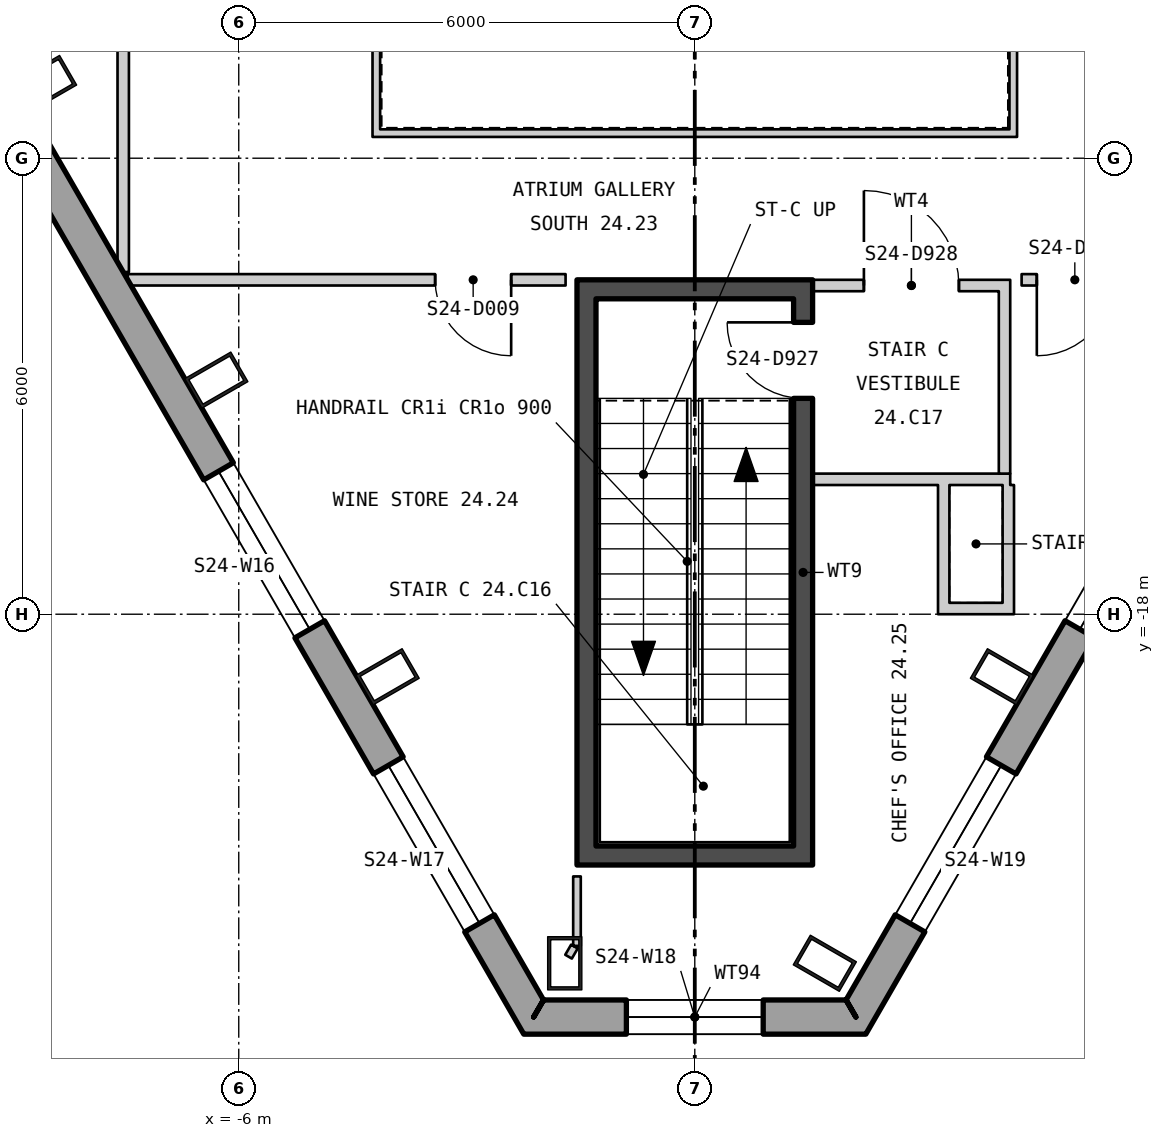
"""IFC4 building model, lengths in metres.
Left out: names, types, materials, properties, quantities, classifications, styles, units other than length and angle.
Written with IfcOpenShell. Run it as: python <this file> out.ifc"""

import sys

from ifc_helpers import new_model, si_unit, direction, frame, frame_2d, origin, origin_2d, place, context, subcontext, project, spatial, polyline, rectangle, hollow_rectangle, outline, extrude, element, fill, save


model = new_model("IFC4")
c1 = context("Model", 3, precision=1e-05, world=origin(), true_north=direction((0.0, 1.0)))
c2 = subcontext(c1, "Body", "Model", "MODEL_VIEW")
j1 = project(units=[si_unit("LENGTHUNIT", "METRE"), si_unit("PLANEANGLEUNIT", "RADIAN")], contexts=[c1])
p1 = place(None, origin())
s1 = spatial("IfcSite", under=j1, at=p1, CompositionType="ELEMENT")
p2 = place(p1, origin())
s2 = spatial("IfcBuilding", under=s1, at=p2, CompositionType="ELEMENT")
p3 = place(p2, frame((0.0, 0.0, 312.6)))
s3 = spatial("IfcBuildingStorey", under=s2, at=p3, CompositionType="ELEMENT", Elevation=312.6)
for number, where, z_axis, x_axis in (
    (1, (-8.548, -11.017, 0.0), (0.0, 0.0, 1.0), (0.5, -0.866, 0.0)),
    (2, (-6.295, -14.92, 0.0), (0.0, 0.0, 1.0), (0.5, -0.866, 0.0)),
    (3, (-4.041, -18.823, 0.0), (0.0, 0.0, 1.0), (0.5, -0.866, 0.0)),
    (4, (-1.711, -22.593, 0.0), (0.0, 0.0, 1.0), (1.0, 0.0, 0.0)),
    (5, (1.711, -22.593, 0.0), (0.0, 0.0, 1.0), (0.5, 0.866, 0.0)),
    (6, (4.041, -18.823, 0.0), (0.0, 0.0, 1.0), (0.5, 0.866, 0.0)),
):
    element("IfcColumn", number, at=place(p3, frame(where, z_axis=z_axis, x_axis=x_axis)), inside=s3, PredefinedType="COLUMN", context=c2, shape_type="SweptSolid", body=[
        extrude(hollow_rectangle(XDim=0.45, YDim=0.7, WallThickness=0.04, at=origin_2d()), origin(), (0.0, 0.0, 1.0), 4.2),
    ])
p4 = place(p3, frame((-24.985, 16.303, -0.18), z_axis=(0.0, 0.0, 1.0), x_axis=(0.500000141277, -0.866025322218, 0.0)))
e7 = element("IfcWall", 7, at=p4, inside=s3, PredefinedType="SOLIDWALL", context=c2, shape_type="SweptSolid", body=[
    extrude(outline(polyline([(-0.13, -0.225), (45.86, -0.225), (45.6, 0.225), (0.13, 0.225), (-0.13, -0.225)])), origin(), (0.0, 0.0, 1.0), 3.98),
])
p5 = place(p4, frame((1.424, 0.0, 1.08)))
e8 = element("IfcOpeningElement", 8, at=p5, cuts=e7, PredefinedType="OPENING", context=c2, shape_type="SweptSolid", body=[
    extrude(rectangle(XDim=2.4, YDim=2.3, at=frame_2d((1.2, 1.15))), frame((0.0, 0.235, 0.0), z_axis=(0.0, -1.0, 0.0), x_axis=(1.0, 0.0, 0.0)), (0.0, 0.0, 1.0), 0.47),
])
p6 = place(p4, frame((5.892, 0.0, 1.08)))
e9 = element("IfcOpeningElement", 9, at=p6, cuts=e7, PredefinedType="OPENING", context=c2, shape_type="SweptSolid", body=[
    extrude(rectangle(XDim=2.4, YDim=2.3, at=frame_2d((1.2, 1.15))), frame((0.0, 0.235, 0.0), z_axis=(0.0, -1.0, 0.0), x_axis=(1.0, 0.0, 0.0)), (0.0, 0.0, 1.0), 0.47),
])
p7 = place(p4, frame((10.399, 0.0, 1.08)))
e10 = element("IfcOpeningElement", 10, at=p7, cuts=e7, PredefinedType="OPENING", context=c2, shape_type="SweptSolid", body=[
    extrude(rectangle(XDim=2.4, YDim=2.3, at=frame_2d((1.2, 1.15))), frame((0.0, 0.235, 0.0), z_axis=(0.0, -1.0, 0.0), x_axis=(1.0, 0.0, 0.0)), (0.0, 0.0, 1.0), 0.47),
])
p8 = place(p4, frame((14.905, 0.0, 1.08)))
e11 = element("IfcOpeningElement", 11, at=p8, cuts=e7, PredefinedType="OPENING", context=c2, shape_type="SweptSolid", body=[
    extrude(rectangle(XDim=2.4, YDim=2.3, at=frame_2d((1.2, 1.15))), frame((0.0, 0.235, 0.0), z_axis=(0.0, -1.0, 0.0), x_axis=(1.0, 0.0, 0.0)), (0.0, 0.0, 1.0), 0.47),
])
p9 = place(p4, frame((19.412, 0.0, 1.08)))
e12 = element("IfcOpeningElement", 12, at=p9, cuts=e7, PredefinedType="OPENING", context=c2, shape_type="SweptSolid", body=[
    extrude(rectangle(XDim=2.4, YDim=2.3, at=frame_2d((1.2, 1.15))), frame((0.0, 0.235, 0.0), z_axis=(0.0, -1.0, 0.0), x_axis=(1.0, 0.0, 0.0)), (0.0, 0.0, 1.0), 0.47),
])
p10 = place(p4, frame((23.918, 0.0, 1.08)))
e13 = element("IfcOpeningElement", 13, at=p10, cuts=e7, PredefinedType="OPENING", context=c2, shape_type="SweptSolid", body=[
    extrude(rectangle(XDim=2.4, YDim=2.3, at=frame_2d((1.2, 1.15))), frame((0.0, 0.235, 0.0), z_axis=(0.0, -1.0, 0.0), x_axis=(1.0, 0.0, 0.0)), (0.0, 0.0, 1.0), 0.47),
])
p11 = place(p4, frame((28.425, 0.0, 1.08)))
e14 = element("IfcOpeningElement", 14, at=p11, cuts=e7, PredefinedType="OPENING", context=c2, shape_type="SweptSolid", body=[
    extrude(rectangle(XDim=2.4, YDim=2.3, at=frame_2d((1.2, 1.15))), frame((0.0, 0.235, 0.0), z_axis=(0.0, -1.0, 0.0), x_axis=(1.0, 0.0, 0.0)), (0.0, 0.0, 1.0), 0.47),
])
p12 = place(p4, frame((37.438, 0.0, 1.08)))
e15 = element("IfcOpeningElement", 15, at=p12, cuts=e7, PredefinedType="OPENING", context=c2, shape_type="SweptSolid", body=[
    extrude(rectangle(XDim=2.4, YDim=2.3, at=frame_2d((1.2, 1.15))), frame((0.0, 0.235, 0.0), z_axis=(0.0, -1.0, 0.0), x_axis=(1.0, 0.0, 0.0)), (0.0, 0.0, 1.0), 0.47),
])
p13 = place(p4, frame((41.907, 0.0, 1.08)))
e16 = element("IfcOpeningElement", 16, at=p13, cuts=e7, PredefinedType="OPENING", context=c2, shape_type="SweptSolid", body=[
    extrude(rectangle(XDim=2.4, YDim=2.3, at=frame_2d((1.2, 1.15))), frame((0.0, 0.235, 0.0), z_axis=(0.0, -1.0, 0.0), x_axis=(1.0, 0.0, 0.0)), (0.0, 0.0, 1.0), 0.47),
])
p14 = place(p3, frame((-2.12, -23.301, -0.18), z_axis=(0.0, 0.0, 1.0), x_axis=(1.0, 0.0, 0.0)))
e17 = element("IfcWall", 17, at=p14, inside=s3, PredefinedType="SOLIDWALL", context=c2, shape_type="SweptSolid", body=[
    extrude(outline(polyline([(-0.13, -0.225), (4.37, -0.225), (4.11, 0.225), (0.13, 0.225), (-0.13, -0.225)])), origin(), (0.0, 0.0, 1.0), 3.98),
])
p15 = place(p14, frame((1.22, 0.0, 1.08)))
e18 = element("IfcOpeningElement", 18, at=p15, cuts=e17, PredefinedType="OPENING", context=c2, shape_type="SweptSolid", body=[
    extrude(rectangle(XDim=1.8, YDim=2.3, at=frame_2d((0.9, 1.15))), frame((0.0, 0.235, 0.0), z_axis=(0.0, -1.0, 0.0), x_axis=(1.0, 0.0, 0.0)), (0.0, 0.0, 1.0), 0.47),
])
p16 = place(p3, frame((2.12, -23.301, -0.18), z_axis=(0.0, 0.0, 1.0), x_axis=(0.500000141277, 0.866025322218, 0.0)))
e19 = element("IfcWall", 19, at=p16, inside=s3, PredefinedType="SOLIDWALL", context=c2, shape_type="SweptSolid", body=[
    extrude(outline(polyline([(-0.13, -0.225), (45.86, -0.225), (45.6, 0.225), (0.13, 0.225), (-0.13, -0.225)])), origin(), (0.0, 0.0, 1.0), 3.98),
])
p17 = place(p16, frame((1.424, 0.0, 1.08)))
e20 = element("IfcOpeningElement", 20, at=p17, cuts=e19, PredefinedType="OPENING", context=c2, shape_type="SweptSolid", body=[
    extrude(rectangle(XDim=2.4, YDim=2.3, at=frame_2d((1.2, 1.15))), frame((0.0, 0.235, 0.0), z_axis=(0.0, -1.0, 0.0), x_axis=(1.0, 0.0, 0.0)), (0.0, 0.0, 1.0), 0.47),
])
p18 = place(p16, frame((5.892, 0.0, 1.08)))
e21 = element("IfcOpeningElement", 21, at=p18, cuts=e19, PredefinedType="OPENING", context=c2, shape_type="SweptSolid", body=[
    extrude(rectangle(XDim=2.4, YDim=2.3, at=frame_2d((1.2, 1.15))), frame((0.0, 0.235, 0.0), z_axis=(0.0, -1.0, 0.0), x_axis=(1.0, 0.0, 0.0)), (0.0, 0.0, 1.0), 0.47),
])
p19 = place(p16, frame((14.905, 0.0, 1.08)))
e22 = element("IfcOpeningElement", 22, at=p19, cuts=e19, PredefinedType="OPENING", context=c2, shape_type="SweptSolid", body=[
    extrude(rectangle(XDim=2.4, YDim=2.3, at=frame_2d((1.2, 1.15))), frame((0.0, 0.235, 0.0), z_axis=(0.0, -1.0, 0.0), x_axis=(1.0, 0.0, 0.0)), (0.0, 0.0, 1.0), 0.47),
])
p20 = place(p16, frame((19.412, 0.0, 1.08)))
e23 = element("IfcOpeningElement", 23, at=p20, cuts=e19, PredefinedType="OPENING", context=c2, shape_type="SweptSolid", body=[
    extrude(rectangle(XDim=2.4, YDim=2.3, at=frame_2d((1.2, 1.15))), frame((0.0, 0.235, 0.0), z_axis=(0.0, -1.0, 0.0), x_axis=(1.0, 0.0, 0.0)), (0.0, 0.0, 1.0), 0.47),
])
p21 = place(p16, frame((23.918, 0.0, 1.08)))
e24 = element("IfcOpeningElement", 24, at=p21, cuts=e19, PredefinedType="OPENING", context=c2, shape_type="SweptSolid", body=[
    extrude(rectangle(XDim=2.4, YDim=2.3, at=frame_2d((1.2, 1.15))), frame((0.0, 0.235, 0.0), z_axis=(0.0, -1.0, 0.0), x_axis=(1.0, 0.0, 0.0)), (0.0, 0.0, 1.0), 0.47),
])
p22 = place(p16, frame((28.425, 0.0, 1.08)))
e25 = element("IfcOpeningElement", 25, at=p22, cuts=e19, PredefinedType="OPENING", context=c2, shape_type="SweptSolid", body=[
    extrude(rectangle(XDim=2.4, YDim=2.3, at=frame_2d((1.2, 1.15))), frame((0.0, 0.235, 0.0), z_axis=(0.0, -1.0, 0.0), x_axis=(1.0, 0.0, 0.0)), (0.0, 0.0, 1.0), 0.47),
])
p23 = place(p16, frame((37.438, 0.0, 1.08)))
e26 = element("IfcOpeningElement", 26, at=p23, cuts=e19, PredefinedType="OPENING", context=c2, shape_type="SweptSolid", body=[
    extrude(rectangle(XDim=2.4, YDim=2.3, at=frame_2d((1.2, 1.15))), frame((0.0, 0.235, 0.0), z_axis=(0.0, -1.0, 0.0), x_axis=(1.0, 0.0, 0.0)), (0.0, 0.0, 1.0), 0.47),
])
p24 = place(p16, frame((41.907, 0.0, 1.08)))
e27 = element("IfcOpeningElement", 27, at=p24, cuts=e19, PredefinedType="OPENING", context=c2, shape_type="SweptSolid", body=[
    extrude(rectangle(XDim=2.4, YDim=2.3, at=frame_2d((1.2, 1.15))), frame((0.0, 0.235, 0.0), z_axis=(0.0, -1.0, 0.0), x_axis=(1.0, 0.0, 0.0)), (0.0, 0.0, 1.0), 0.47),
])
p25 = place(p3, frame((-4.24, -11.67, 0.0), z_axis=(0.0, 0.0, 1.0), x_axis=(1.0, 0.0, 0.0)))
e28 = element("IfcWall", 28, at=p25, inside=s3, PredefinedType="PARTITIONING", context=c2, shape_type="SweptSolid", body=[
    extrude(rectangle(XDim=8.48, YDim=0.1, at=frame_2d((4.24, 0.0))), origin(), (0.0, 0.0, 1.0), 4.0),
])
for number, where, z_axis, x_axis in (
    (29, (4.19, -11.62, 0.0), (0.0, 0.0, 1.0), (0.0, 1.0, 0.0)),
    (30, (-4.19, -3.58, 0.0), (0.0, 0.0, 1.0), (0.0, -1.0, 0.0)),
):
    element("IfcWall", number, at=place(p3, frame(where, z_axis=z_axis, x_axis=x_axis)), inside=s3, PredefinedType="PARTITIONING", context=c2, shape_type="SweptSolid", body=[
        extrude(rectangle(XDim=8.04, YDim=0.1, at=frame_2d((4.02, 0.0))), origin(), (0.0, 0.0, 1.0), 4.0),
    ])
p26 = place(p3, frame((-1.425, -21.05, 0.0), z_axis=(0.0, 0.0, 1.0), x_axis=(0.0, 1.0, 0.0)))
e31 = element("IfcWall", 31, at=p26, inside=s3, PredefinedType="SHEAR", context=c2, shape_type="SweptSolid", body=[
    extrude(rectangle(XDim=7.2, YDim=0.25, at=frame_2d((3.6, 0.0))), origin(), (0.0, 0.0, 1.0), 4.0),
])
p27 = place(p3, frame((1.425, -21.05, 0.0), z_axis=(0.0, 0.0, 1.0), x_axis=(0.0, 1.0, 0.0)))
e32 = element("IfcWall", 32, at=p27, inside=s3, PredefinedType="SHEAR", context=c2, shape_type="SweptSolid", body=[
    extrude(rectangle(XDim=7.2, YDim=0.25, at=frame_2d((3.6, 0.0))), origin(), (0.0, 0.0, 1.0), 4.0),
])
p28 = place(p27, frame((5.89, 0.0, 0.0)))
e33 = element("IfcOpeningElement", 33, at=p28, cuts=e32, PredefinedType="OPENING", context=c2, shape_type="SweptSolid", body=[
    extrude(rectangle(XDim=1.0, YDim=2.1, at=frame_2d((0.5, 1.05))), frame((0.0, 0.135, 0.0), z_axis=(0.0, -1.0, 0.0), x_axis=(1.0, 0.0, 0.0)), (0.0, 0.0, 1.0), 0.27),
])
for number, where, z_axis, x_axis in (
    (34, (-1.55, -21.175, 0.0), (0.0, 0.0, 1.0), (1.0, 0.0, 0.0)),
    (35, (-1.55, -13.725, 0.0), (0.0, 0.0, 1.0), (1.0, 0.0, 0.0)),
):
    element("IfcWall", number, at=place(p3, frame(where, z_axis=z_axis, x_axis=x_axis)), inside=s3, PredefinedType="SHEAR", context=c2, shape_type="SweptSolid", body=[
        extrude(rectangle(XDim=3.1, YDim=0.25, at=frame_2d((1.55, 0.0))), origin(), (0.0, 0.0, 1.0), 4.0),
    ])
p29 = place(p3, frame((1.55, -16.225, 0.0), z_axis=(0.0, 0.0, 1.0), x_axis=(1.0, 0.0, 0.0)))
e36 = element("IfcWall", 36, at=p29, inside=s3, PredefinedType="PARTITIONING", context=c2, shape_type="SweptSolid", body=[
    extrude(rectangle(XDim=2.6, YDim=0.15, at=frame_2d((1.3, 0.0))), origin(), (0.0, 0.0, 1.0), 4.0),
])
p30 = place(p3, frame((4.075, -16.15, 0.0), z_axis=(0.0, 0.0, 1.0), x_axis=(0.0, 1.0, 0.0)))
e37 = element("IfcWall", 37, at=p30, inside=s3, PredefinedType="PARTITIONING", context=c2, shape_type="SweptSolid", body=[
    extrude(rectangle(XDim=2.4, YDim=0.15, at=frame_2d((1.2, 0.0))), origin(), (0.0, 0.0, 1.0), 4.0),
])
p31 = place(p3, frame((1.55, -13.675, 0.0), z_axis=(0.0, 0.0, 1.0), x_axis=(1.0, 0.0, 0.0)))
e38 = element("IfcWall", 38, at=p31, inside=s3, PredefinedType="PARTITIONING", context=c2, shape_type="SweptSolid", body=[
    extrude(rectangle(XDim=2.6, YDim=0.15, at=frame_2d((1.3, 0.0))), origin(), (0.0, 0.0, 1.0), 3.21),
])
p32 = place(p31, frame((0.675, 0.0, 0.0)))
e39 = element("IfcOpeningElement", 39, at=p32, cuts=e38, PredefinedType="OPENING", context=c2, shape_type="SweptSolid", body=[
    extrude(rectangle(XDim=1.25, YDim=2.1, at=frame_2d((0.625, 1.05))), frame((0.0, 0.085, 0.0), z_axis=(0.0, -1.0, 0.0), x_axis=(1.0, 0.0, 0.0)), (0.0, 0.0, 1.0), 0.17),
])
p33 = place(p3, frame((3.275, -18.0, 0.0), z_axis=(0.0, 0.0, 1.0), x_axis=(0.0, 1.0, 0.0)))
e40 = element("IfcWall", 40, at=p33, inside=s3, PredefinedType="PARTITIONING", context=c2, shape_type="SweptSolid", body=[
    extrude(rectangle(XDim=1.7, YDim=0.15, at=frame_2d((0.85, 0.0))), origin(), (0.0, 0.0, 1.0), 3.55),
])
p34 = place(p3, frame((3.35, -17.925, 0.0), z_axis=(0.0, 0.0, 1.0), x_axis=(1.0, 0.0, 0.0)))
e41 = element("IfcWall", 41, at=p34, inside=s3, PredefinedType="PARTITIONING", context=c2, shape_type="SweptSolid", body=[
    extrude(rectangle(XDim=0.7, YDim=0.15, at=frame_2d((0.35, 0.0))), origin(), (0.0, 0.0, 1.0), 4.0),
])
p35 = place(p3, frame((4.125, -18.0, 0.0), z_axis=(0.0, 0.0, 1.0), x_axis=(0.0, 1.0, 0.0)))
e42 = element("IfcWall", 42, at=p35, inside=s3, PredefinedType="PARTITIONING", context=c2, shape_type="SweptSolid", body=[
    extrude(rectangle(XDim=1.7, YDim=0.15, at=frame_2d((0.85, 0.0))), origin(), (0.0, 0.0, 1.0), 4.0),
])
p36 = place(p3, frame((-7.52, -13.498, 0.0), z_axis=(0.0, 0.0, 1.0), x_axis=(0.0, 1.0, 0.0)))
e43 = element("IfcWall", 43, at=p36, inside=s3, PredefinedType="PARTITIONING", context=c2, shape_type="SweptSolid", body=[
    extrude(rectangle(XDim=13.482, YDim=0.15, at=frame_2d((6.741, 0.0))), origin(), (0.0, 0.0, 1.0), 4.0),
])
p37 = place(p36, frame((3.639, 0.0, 0.0)))
e44 = element("IfcOpeningElement", 44, at=p37, cuts=e43, PredefinedType="OPENING", context=c2, shape_type="SweptSolid", body=[
    extrude(rectangle(XDim=1.0, YDim=2.1, at=frame_2d((0.5, 1.05))), frame((0.0, 0.085, 0.0), z_axis=(0.0, -1.0, 0.0), x_axis=(1.0, 0.0, 0.0)), (0.0, 0.0, 1.0), 0.17),
])
p38 = place(p36, frame((11.681, 0.0, 0.0)))
e45 = element("IfcOpeningElement", 45, at=p38, cuts=e43, PredefinedType="OPENING", context=c2, shape_type="SweptSolid", body=[
    extrude(rectangle(XDim=1.0, YDim=2.1, at=frame_2d((0.5, 1.05))), frame((0.0, 0.085, 0.0), z_axis=(0.0, -1.0, 0.0), x_axis=(1.0, 0.0, 0.0)), (0.0, 0.0, 1.0), 0.17),
])
p39 = place(p3, frame((-7.461, -13.6, 0.0), z_axis=(0.0, 0.0, 1.0), x_axis=(1.0, 0.0, 0.0)))
e46 = element("IfcWall", 46, at=p39, inside=s3, PredefinedType="PARTITIONING", context=c2, shape_type="SweptSolid", body=[
    extrude(rectangle(XDim=0.606, YDim=0.15, at=frame_2d((0.303, 0.0))), origin(), (0.0, 0.0, 1.0), 4.0),
])
p40 = place(p3, frame((-6.855, -13.6, 0.0), z_axis=(0.0, 0.0, 1.0), x_axis=(1.0, 0.0, 0.0)))
e47 = element("IfcWall", 47, at=p40, inside=s3, PredefinedType="PARTITIONING", context=c2, shape_type="SweptSolid", body=[
    extrude(rectangle(XDim=5.155, YDim=0.15, at=frame_2d((2.578, 0.0))), origin(), (0.0, 0.0, 1.0), 3.21),
])
p41 = place(p40, frame((3.439, 0.0, 0.0)))
e48 = element("IfcOpeningElement", 48, at=p41, cuts=e47, PredefinedType="OPENING", context=c2, shape_type="SweptSolid", body=[
    extrude(rectangle(XDim=1.0, YDim=2.1, at=frame_2d((0.5, 1.05))), frame((0.0, 0.085, 0.0), z_axis=(0.0, -1.0, 0.0), x_axis=(1.0, 0.0, 0.0)), (0.0, 0.0, 1.0), 0.17),
])
p42 = place(p3, frame((-1.661, -22.506, 0.0), z_axis=(0.0, 0.0, 1.0), x_axis=(0.501036270542, 0.865426285481, 0.0)))
e49 = element("IfcWall", 49, at=p42, inside=s3, PredefinedType="PARTITIONING", context=c2, shape_type="SweptSolid", body=[
    extrude(rectangle(XDim=0.154, YDim=0.1, at=frame_2d((0.077, 0.0))), origin(), (0.0, 0.0, 1.0), 4.0),
])
p43 = place(p3, frame((-1.55, -22.364, 0.0), z_axis=(0.0, 0.0, 1.0), x_axis=(0.0, 1.0, 0.0)))
e50 = element("IfcWall", 50, at=p43, inside=s3, PredefinedType="PARTITIONING", context=c2, shape_type="SweptSolid", body=[
    extrude(rectangle(XDim=0.914, YDim=0.1, at=frame_2d((0.457, 0.0))), origin(), (0.0, 0.0, 1.0), 4.0),
])
p44 = place(p3, frame((4.3, -13.6, 0.0), z_axis=(0.0, 0.0, 1.0), x_axis=(1.0, 0.0, 0.0)))
e51 = element("IfcWall", 51, at=p44, inside=s3, PredefinedType="PARTITIONING", context=c2, shape_type="SweptSolid", body=[
    extrude(rectangle(XDim=2.555, YDim=0.15, at=frame_2d((1.278, 0.0))), origin(), (0.0, 0.0, 1.0), 3.21),
])
p45 = place(p44, frame((0.2, 0.0, 0.0)))
e52 = element("IfcOpeningElement", 52, at=p45, cuts=e51, PredefinedType="OPENING", context=c2, shape_type="SweptSolid", body=[
    extrude(rectangle(XDim=1.0, YDim=2.1, at=frame_2d((0.5, 1.05))), frame((0.0, 0.085, 0.0), z_axis=(0.0, -1.0, 0.0), x_axis=(1.0, 0.0, 0.0)), (0.0, 0.0, 1.0), 0.17),
])
p46 = place(p12, origin())
e53 = element("IfcWindow", 53, at=p46, inside=s3, PartitioningType="SINGLE_PANEL", PredefinedType="WINDOW", context=c2, shape_type="SweptSolid", body=[
    extrude(rectangle(XDim=2.4, YDim=2.3, at=frame_2d((1.2, 1.15))), frame((0.0, 0.105, 0.0), z_axis=(0.0, -1.0, 0.0), x_axis=(1.0, 0.0, 0.0)), (0.0, 0.0, 1.0), 0.06),
])
fill(e15, e53)
p47 = place(p13, origin())
e54 = element("IfcWindow", 54, at=p47, inside=s3, PartitioningType="SINGLE_PANEL", PredefinedType="WINDOW", context=c2, shape_type="SweptSolid", body=[
    extrude(rectangle(XDim=2.4, YDim=2.3, at=frame_2d((1.2, 1.15))), frame((0.0, 0.105, 0.0), z_axis=(0.0, -1.0, 0.0), x_axis=(1.0, 0.0, 0.0)), (0.0, 0.0, 1.0), 0.06),
])
fill(e16, e54)
p48 = place(p15, origin())
e55 = element("IfcWindow", 55, at=p48, inside=s3, PartitioningType="SINGLE_PANEL", PredefinedType="WINDOW", context=c2, shape_type="SweptSolid", body=[
    extrude(rectangle(XDim=1.8, YDim=2.3, at=frame_2d((0.9, 1.15))), frame((0.0, 0.105, 0.0), z_axis=(0.0, -1.0, 0.0), x_axis=(1.0, 0.0, 0.0)), (0.0, 0.0, 1.0), 0.06),
])
fill(e18, e55)
p49 = place(p17, origin())
e56 = element("IfcWindow", 56, at=p49, inside=s3, PartitioningType="SINGLE_PANEL", PredefinedType="WINDOW", context=c2, shape_type="SweptSolid", body=[
    extrude(rectangle(XDim=2.4, YDim=2.3, at=frame_2d((1.2, 1.15))), frame((0.0, 0.105, 0.0), z_axis=(0.0, -1.0, 0.0), x_axis=(1.0, 0.0, 0.0)), (0.0, 0.0, 1.0), 0.06),
])
fill(e20, e56)
p50 = place(p18, origin())
e57 = element("IfcWindow", 57, at=p50, inside=s3, PartitioningType="SINGLE_PANEL", PredefinedType="WINDOW", context=c2, shape_type="SweptSolid", body=[
    extrude(rectangle(XDim=2.4, YDim=2.3, at=frame_2d((1.2, 1.15))), frame((0.0, 0.105, 0.0), z_axis=(0.0, -1.0, 0.0), x_axis=(1.0, 0.0, 0.0)), (0.0, 0.0, 1.0), 0.06),
])
fill(e21, e57)
p51 = place(p28, origin())
e58 = element("IfcDoor", 58, at=p51, inside=s3, OperationType="SINGLE_SWING_LEFT", PredefinedType="DOOR", context=c2, shape_type="SweptSolid", body=[
    extrude(rectangle(XDim=1.0, YDim=2.1, at=frame_2d((0.5, 1.05))), frame((0.0, 0.025, 0.0), z_axis=(0.0, -1.0, 0.0), x_axis=(1.0, 0.0, 0.0)), (0.0, 0.0, 1.0), 0.05),
])
fill(e33, e58)
p52 = place(p32, origin())
e59 = element("IfcDoor", 59, at=p52, inside=s3, OperationType="SINGLE_SWING_RIGHT", PredefinedType="DOOR", context=c2, shape_type="SweptSolid", body=[
    extrude(rectangle(XDim=1.25, YDim=2.1, at=frame_2d((0.625, 1.05))), frame((0.0, 0.025, 0.0), z_axis=(0.0, -1.0, 0.0), x_axis=(1.0, 0.0, 0.0)), (0.0, 0.0, 1.0), 0.05),
])
fill(e39, e59)
p53 = place(p41, origin())
e60 = element("IfcDoor", 60, at=p53, inside=s3, OperationType="SINGLE_SWING_RIGHT", PredefinedType="DOOR", context=c2, shape_type="SweptSolid", body=[
    extrude(rectangle(XDim=1.0, YDim=2.1, at=frame_2d((0.5, 1.05))), frame((0.0, 0.025, 0.0), z_axis=(0.0, -1.0, 0.0), x_axis=(1.0, 0.0, 0.0)), (0.0, 0.0, 1.0), 0.05),
])
fill(e48, e60)
p54 = place(p45, origin())
e61 = element("IfcDoor", 61, at=p54, inside=s3, OperationType="SINGLE_SWING_LEFT", PredefinedType="DOOR", context=c2, shape_type="SweptSolid", body=[
    extrude(rectangle(XDim=1.0, YDim=2.1, at=frame_2d((0.5, 1.05))), frame((0.0, 0.025, 0.0), z_axis=(0.0, -1.0, 0.0), x_axis=(1.0, 0.0, 0.0)), (0.0, 0.0, 1.0), 0.05),
])
fill(e52, e61)
save(model, sys.argv[1])
